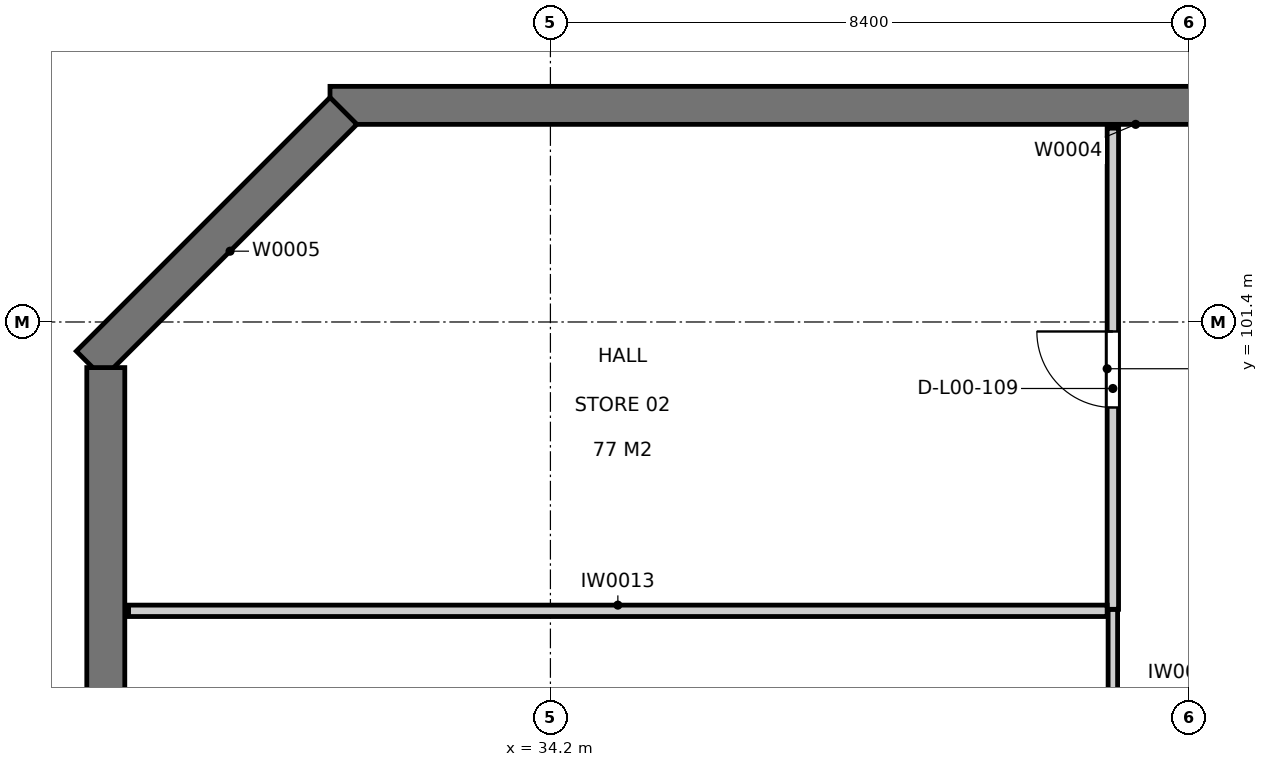
"""IFC4 building model, lengths in metres.
Left out: names, types, materials, properties, quantities, classifications, styles, units other than length and angle.
Written with IfcOpenShell. Run it as: python <this file> out.ifc"""

import sys

from ifc_helpers import new_model, si_unit, direction, frame, frame_2d, origin, place, context, subcontext, project, spatial, rectangle, extrude, element, fill, save


model = new_model("IFC4")
c1 = context("Model", 3, precision=1e-05, world=origin(), true_north=direction((0.0, 1.0)))
c2 = subcontext(c1, "Body", "Model", "MODEL_VIEW")
j1 = project(units=[si_unit("LENGTHUNIT", "METRE"), si_unit("PLANEANGLEUNIT", "RADIAN")], contexts=[c1])
p1 = place(None, origin())
s1 = spatial("IfcSite", under=j1, at=p1, CompositionType="ELEMENT")
p2 = place(p1, origin())
s2 = spatial("IfcBuilding", under=s1, at=p2, CompositionType="ELEMENT")
p3 = place(p2, origin())
s3 = spatial("IfcBuildingStorey", under=s2, at=p3, CompositionType="ELEMENT", Elevation=0.0)
p4 = place(p3, frame((53.9, 104.25, 0.0), z_axis=(0.0, 0.0, 1.0), x_axis=(-1.0, 0.0, 0.0)))
e1 = element("IfcWall", 1, at=p4, inside=s3, PredefinedType="SOLIDWALL", context=c2, shape_type="SweptSolid", body=[
    extrude(rectangle(XDim=22.6, YDim=0.5, at=frame_2d((11.3, 0.0))), origin(), (0.0, 0.0, 1.0), 4.8),
])
p5 = place(p4, frame((10.15, 0.0, 0.0)))
e2 = element("IfcOpeningElement", 2, at=p5, cuts=e1, PredefinedType="OPENING", context=c2, shape_type="SweptSolid", body=[
    extrude(rectangle(XDim=1.0, YDim=2.1, at=frame_2d((0.5, 1.05))), frame((0.0, 0.26, 0.0), z_axis=(0.0, -1.0, 0.0), x_axis=(1.0, 0.0, 0.0)), (0.0, 0.0, 1.0), 0.52),
])
p6 = place(p3, frame((31.477, 104.177, 0.0), z_axis=(0.0, 0.0, 1.0), x_axis=(-0.707106781187, -0.707106781187, 0.0)))
e3 = element("IfcWall", 3, at=p6, inside=s3, PredefinedType="SOLIDWALL", context=c2, shape_type="SweptSolid", body=[
    extrude(rectangle(XDim=4.72, YDim=0.5, at=frame_2d((2.36, 0.0))), origin(), (0.0, 0.0, 1.0), 4.8),
])
p7 = place(p3, frame((28.35, 100.8, 0.0), z_axis=(0.0, 0.0, 1.0), x_axis=(0.0, -1.0, 0.0)))
e4 = element("IfcWall", 4, at=p7, inside=s3, PredefinedType="SOLIDWALL", context=c2, shape_type="SweptSolid", body=[
    extrude(rectangle(XDim=38.151, YDim=0.5, at=frame_2d((19.076, 0.0))), origin(), (0.0, 0.0, 1.0), 4.8),
])
p8 = place(p3, frame((41.6, 89.62, 0.0), z_axis=(0.0, 0.0, 1.0), x_axis=(0.0, 1.0, 0.0)))
e5 = element("IfcWall", 5, at=p8, inside=s3, PredefinedType="PARTITIONING", context=c2, shape_type="SweptSolid", body=[
    extrude(rectangle(XDim=8.0, YDim=0.125, at=frame_2d((4.0, 0.0))), origin(), (0.0, 0.0, 1.0), 3.6),
])
p9 = place(p8, frame((3.53, 0.0, 0.0)))
e6 = element("IfcOpeningElement", 6, at=p9, cuts=e5, PredefinedType="OPENING", context=c2, shape_type="SweptSolid", body=[
    extrude(rectangle(XDim=0.9, YDim=2.1, at=frame_2d((0.45, 1.05))), frame((0.0, 0.073, 0.0), z_axis=(0.0, -1.0, 0.0), x_axis=(1.0, 0.0, 0.0)), (0.0, 0.0, 1.0), 0.145),
])
p10 = place(p3, frame((41.6, 97.62, 0.0), z_axis=(0.0, 0.0, 1.0), x_axis=(0.0, 1.0, 0.0)))
e7 = element("IfcWall", 7, at=p10, inside=s3, PredefinedType="PARTITIONING", context=c2, shape_type="SweptSolid", body=[
    extrude(rectangle(XDim=6.33, YDim=0.15, at=frame_2d((3.165, 0.0))), origin(), (0.0, 0.0, 1.0), 3.6),
])
p11 = place(p10, frame((2.655, 0.0, 0.0)))
e8 = element("IfcOpeningElement", 8, at=p11, cuts=e7, PredefinedType="OPENING", context=c2, shape_type="SweptSolid", body=[
    extrude(rectangle(XDim=1.0, YDim=2.1, at=frame_2d((0.5, 1.05))), frame((0.0, 0.085, 0.0), z_axis=(0.0, -1.0, 0.0), x_axis=(1.0, 0.0, 0.0)), (0.0, 0.0, 1.0), 0.17),
])
p12 = place(p3, frame((28.65, 97.6, 0.0), z_axis=(0.0, 0.0, 1.0), x_axis=(1.0, 0.0, 0.0)))
e9 = element("IfcWall", 9, at=p12, inside=s3, PredefinedType="PARTITIONING", context=c2, shape_type="SweptSolid", body=[
    extrude(rectangle(XDim=12.875, YDim=0.15, at=frame_2d((6.438, 0.0))), origin(), (0.0, 0.0, 1.0), 3.6),
])
p13 = place(p11, origin())
e10 = element("IfcDoor", 10, at=p13, inside=s3, OperationType="SINGLE_SWING_RIGHT", PredefinedType="DOOR", context=c2, shape_type="SweptSolid", body=[
    extrude(rectangle(XDim=1.0, YDim=2.1, at=frame_2d((0.5, 1.05))), frame((0.0, 0.025, 0.0), z_axis=(0.0, -1.0, 0.0), x_axis=(1.0, 0.0, 0.0)), (0.0, 0.0, 1.0), 0.05),
])
fill(e8, e10)
save(model, sys.argv[1])
